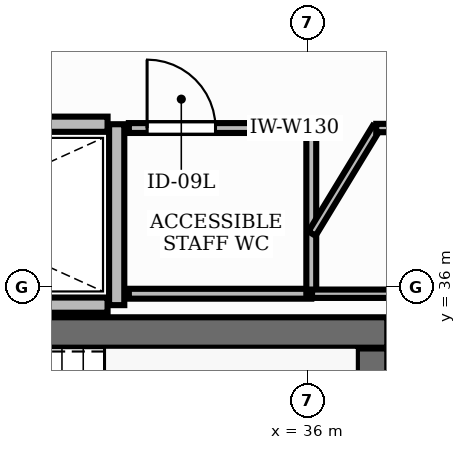
"""IFC4 building model, lengths in metres.
Left out: names, types, materials, properties, quantities, classifications, styles, units other than length and angle.
Written with IfcOpenShell. Run it as: python <this file> out.ifc"""

import sys

from ifc_helpers import new_model, si_unit, direction, frame, frame_2d, origin, place, context, subcontext, project, spatial, rectangle, extrude, element, fill, save


model = new_model("IFC4")
c1 = context("Model", 3, precision=1e-05, world=origin(), true_north=direction((0.0, 1.0)))
c2 = subcontext(c1, "Body", "Model", "MODEL_VIEW")
j1 = project(units=[si_unit("LENGTHUNIT", "METRE"), si_unit("PLANEANGLEUNIT", "RADIAN")], contexts=[c1])
p1 = place(None, origin())
s1 = spatial("IfcSite", under=j1, at=p1, CompositionType="ELEMENT")
p2 = place(p1, origin())
s2 = spatial("IfcBuilding", under=s1, at=p2, CompositionType="ELEMENT")
p3 = place(p2, frame((0.0, 0.0, 260.4)))
s3 = spatial("IfcBuildingStorey", under=s2, at=p3, CompositionType="ELEMENT", Elevation=260.4)
p4 = place(p3, frame((28.852, 35.4, 0.0), z_axis=(0.0, 0.0, 1.0), x_axis=(1.0, 0.0, 0.0)))
e1 = element("IfcWall", 1, at=p4, inside=s3, PredefinedType="SHEAR", context=c2, shape_type="SweptSolid", body=[
    extrude(rectangle(XDim=8.198, YDim=0.4, at=frame_2d((4.099, 0.0))), origin(), (0.0, 0.0, 1.0), 3.9),
])
p5 = place(p3, frame((36.85, 32.11, 0.0), z_axis=(0.0, 0.0, 1.0), x_axis=(0.0, 1.0, 0.0)))
e2 = element("IfcWall", 2, at=p5, inside=s3, PredefinedType="SHEAR", context=c2, shape_type="SweptSolid", body=[
    extrude(rectangle(XDim=3.08, YDim=0.4, at=frame_2d((1.54, 0.0))), origin(), (0.0, 0.0, 1.0), 3.9),
])
p6 = place(p3, frame((33.49, 35.76, 0.0), z_axis=(0.0, 0.0, 1.0), x_axis=(0.0, 1.0, 0.0)))
e3 = element("IfcWall", 3, at=p6, inside=s3, PredefinedType="PARTITIONING", context=c2, shape_type="SweptSolid", body=[
    extrude(rectangle(XDim=2.38, YDim=0.2, at=frame_2d((1.19, 0.0))), origin(), (0.0, 0.0, 1.0), 2.91),
])
for number, where, z_axis, x_axis in (
    (4, (28.8, 35.76, 0.0), (0.0, 0.0, 1.0), (1.0, 0.0, 0.0)),
    (5, (28.8, 38.14, 0.0), (0.0, 0.0, 1.0), (1.0, 0.0, 0.0)),
):
    element("IfcWall", number, at=place(p3, frame(where, z_axis=z_axis, x_axis=x_axis)), inside=s3, PredefinedType="PARTITIONING", context=c2, shape_type="SweptSolid", body=[
        extrude(rectangle(XDim=4.57, YDim=0.2, at=frame_2d((2.285, 0.0))), origin(), (0.0, 0.0, 1.0), 2.91),
    ])
p7 = place(p3, frame((33.65, 38.09, 0.0), z_axis=(0.0, 0.0, 1.0), x_axis=(1.0, 0.0, 0.0)))
e6 = element("IfcWall", 6, at=p7, inside=s3, PredefinedType="PARTITIONING", context=c2, shape_type="SweptSolid", body=[
    extrude(rectangle(XDim=2.4, YDim=0.13, at=frame_2d((1.2, 0.0))), origin(), (0.0, 0.0, 1.0), 2.91),
])
p8 = place(p7, frame((0.24, 0.0, 0.0)))
e7 = element("IfcOpeningElement", 7, at=p8, cuts=e6, PredefinedType="OPENING", context=c2, shape_type="SweptSolid", body=[
    extrude(rectangle(XDim=0.9, YDim=2.15, at=frame_2d((0.45, 1.075))), frame((0.0, 0.08, 0.0), z_axis=(0.0, -1.0, 0.0), x_axis=(1.0, 0.0, 0.0)), (0.0, 0.0, 1.0), 0.16),
])
p9 = place(p3, frame((36.05, 35.91, 0.0), z_axis=(0.0, 0.0, 1.0), x_axis=(-1.0, 0.0, 0.0)))
e8 = element("IfcWall", 8, at=p9, inside=s3, PredefinedType="PARTITIONING", context=c2, shape_type="SweptSolid", body=[
    extrude(rectangle(XDim=2.4, YDim=0.13, at=frame_2d((1.2, 0.0))), origin(), (0.0, 0.0, 1.0), 2.91),
])
p10 = place(p3, frame((36.05, 38.09, 0.0), z_axis=(0.0, 0.0, 1.0), x_axis=(0.0, -1.0, 0.0)))
e9 = element("IfcWall", 9, at=p10, inside=s3, PredefinedType="PARTITIONING", context=c2, shape_type="SweptSolid", body=[
    extrude(rectangle(XDim=2.18, YDim=0.13, at=frame_2d((1.09, 0.0))), origin(), (0.0, 0.0, 1.0), 2.91),
])
p11 = place(p3, frame((37.35, 35.91, 0.0), z_axis=(0.0, 0.0, 1.0), x_axis=(-1.0, 0.0, 0.0)))
e10 = element("IfcWall", 10, at=p11, inside=s3, PredefinedType="MOVABLE", context=c2, shape_type="SweptSolid", body=[
    extrude(rectangle(XDim=1.29, YDim=0.11, at=frame_2d((0.645, 0.0))), origin(), (0.0, 0.0, 1.0), 2.91),
])
p12 = place(p3, frame((36.06, 36.701, 0.0), z_axis=(0.0, 0.0, 1.0), x_axis=(0.519499134934, 0.854470975986, 0.0)))
e11 = element("IfcWall", 11, at=p12, inside=s3, PredefinedType="MOVABLE", context=c2, shape_type="SweptSolid", body=[
    extrude(rectangle(XDim=1.626, YDim=0.11, at=frame_2d((0.813, 0.0))), origin(), (0.0, 0.0, 1.0), 2.91),
])
p13 = place(p3, frame((36.905, 38.09, 0.0), z_axis=(0.0, 0.0, 1.0), x_axis=(1.0, 0.0, 0.0)))
e12 = element("IfcWall", 12, at=p13, inside=s3, PredefinedType="MOVABLE", context=c2, shape_type="SweptSolid", body=[
    extrude(rectangle(XDim=0.295, YDim=0.11, at=frame_2d((0.147, 0.0))), origin(), (0.0, 0.0, 1.0), 2.91),
])
p14 = place(p8, origin())
e13 = element("IfcDoor", 13, at=p14, inside=s3, OperationType="SINGLE_SWING_LEFT", PredefinedType="DOOR", context=c2, shape_type="SweptSolid", body=[
    extrude(rectangle(XDim=0.9, YDim=2.15, at=frame_2d((0.45, 1.075))), frame((0.0, 0.025, 0.0), z_axis=(0.0, -1.0, 0.0), x_axis=(1.0, 0.0, 0.0)), (0.0, 0.0, 1.0), 0.05),
])
fill(e7, e13)
save(model, sys.argv[1])
